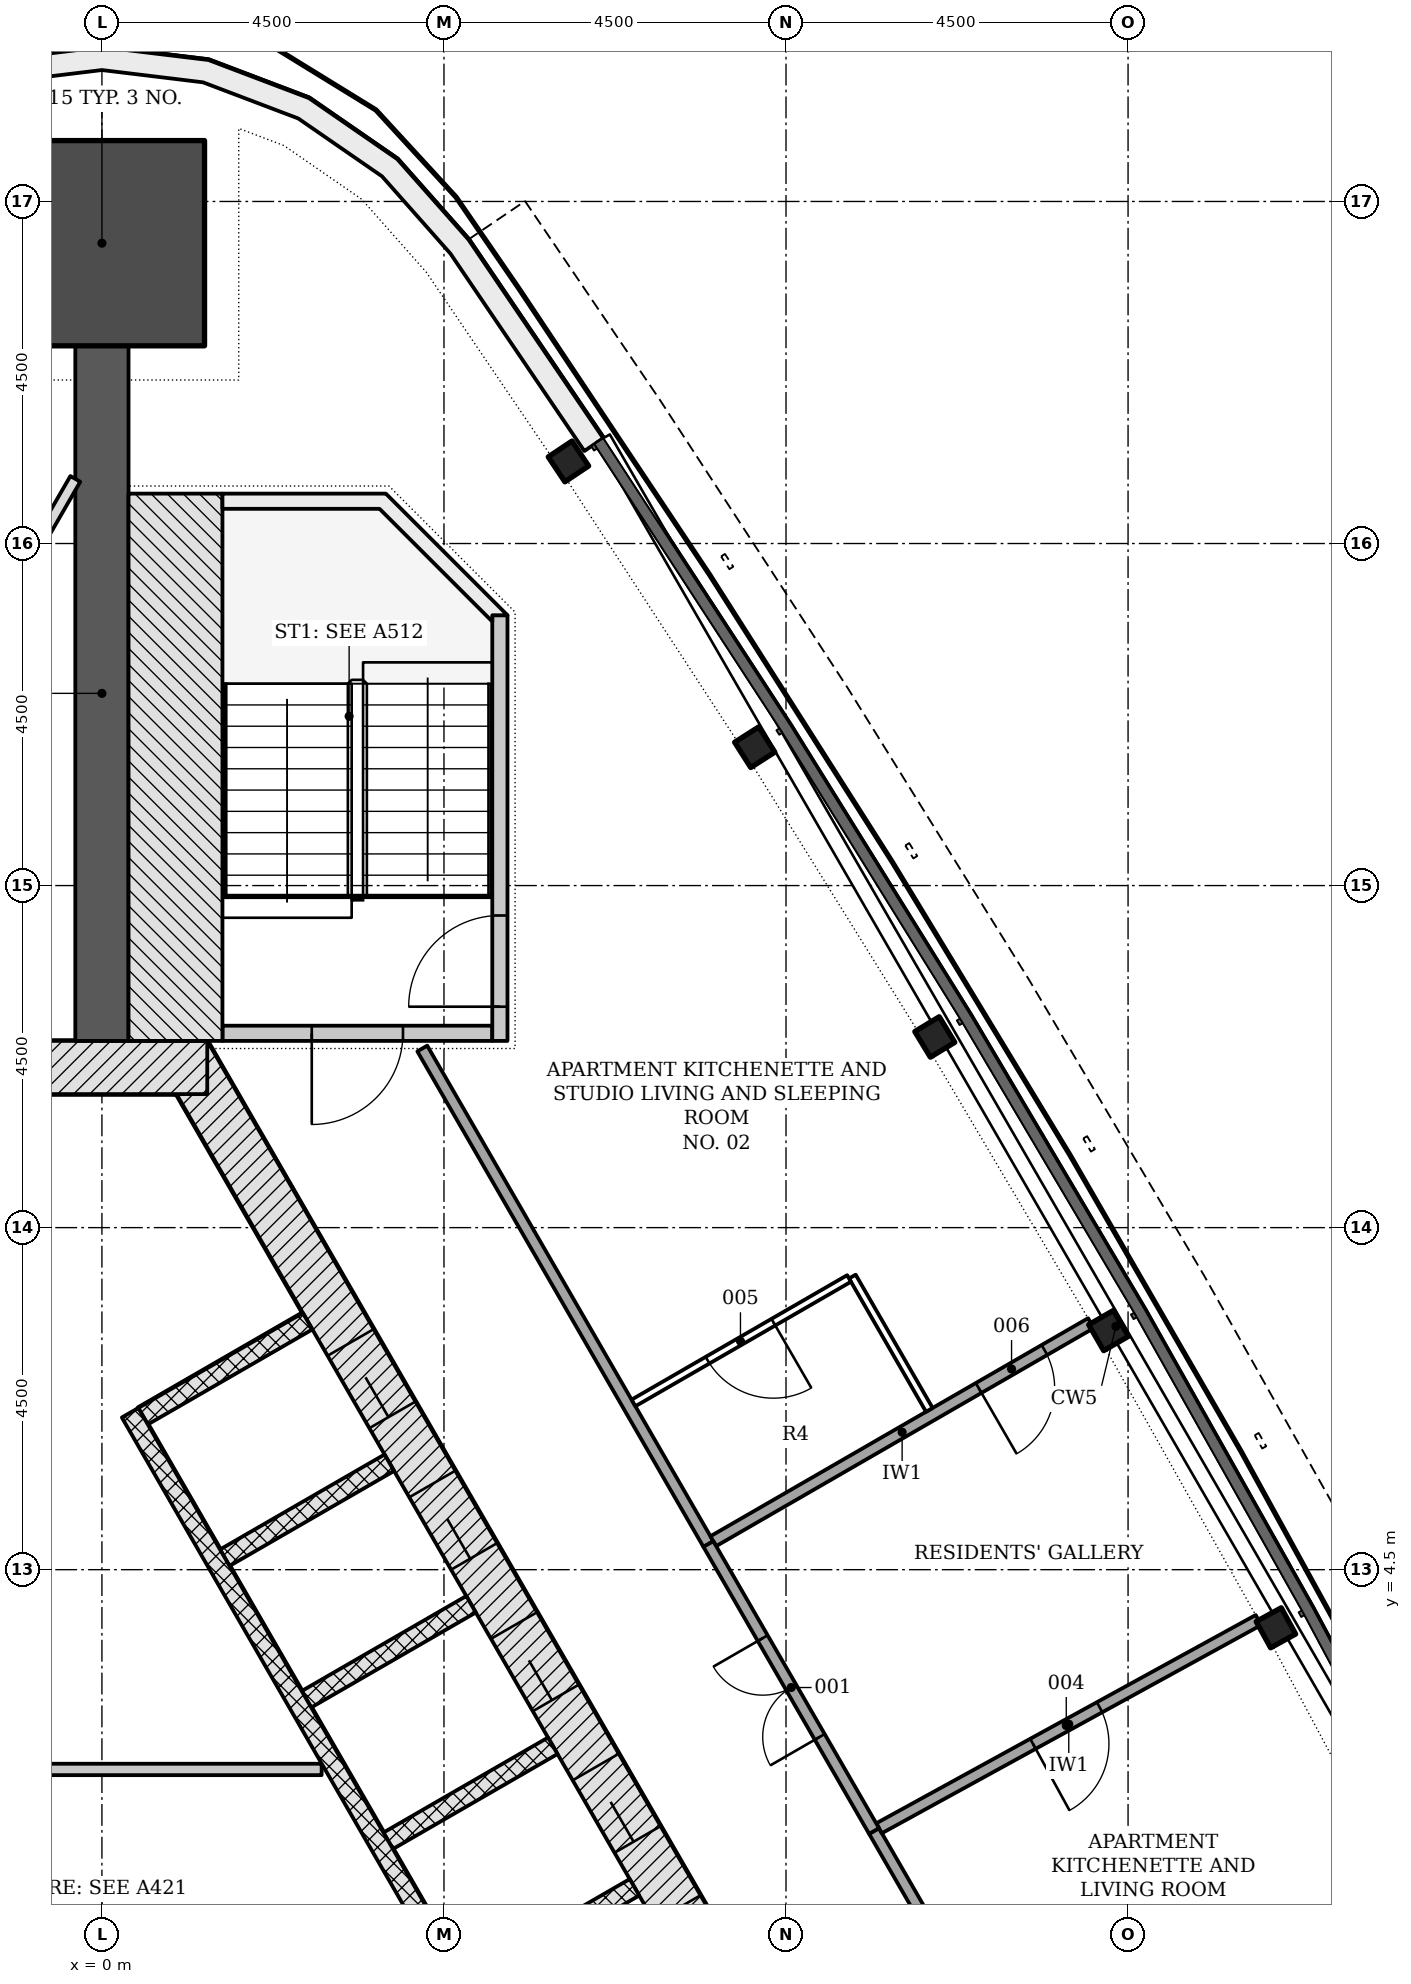
"""IFC4 building model, lengths in metres.
Left out: names, types, materials, properties, quantities, classifications, styles, units other than length and angle.
Written with IfcOpenShell. Run it as: python <this file> out.ifc"""

import sys

from ifc_helpers import new_model, si_unit, direction, frame, frame_2d, origin, origin_2d, place, context, subcontext, project, spatial, polyline, rectangle, i_section, outline, extrude, element, fill, save


model = new_model("IFC4")
c1 = context("Model", 3, precision=1e-05, world=origin(), true_north=direction((0.0, 1.0)))
c2 = subcontext(c1, "Body", "Model", "MODEL_VIEW")
j1 = project(units=[si_unit("LENGTHUNIT", "METRE"), si_unit("PLANEANGLEUNIT", "RADIAN")], contexts=[c1])
p1 = place(None, origin())
s1 = spatial("IfcSite", under=j1, at=p1, CompositionType="ELEMENT")
p2 = place(p1, origin())
s2 = spatial("IfcBuilding", under=s1, at=p2, CompositionType="ELEMENT")
p3 = place(p2, frame((0.0, 0.0, 192.3)))
s3 = spatial("IfcBuildingStorey", under=s2, at=p3, CompositionType="ELEMENT", Elevation=192.3)
p4 = place(p3, frame((10.311, -4.703, -0.2), z_axis=(0.0, 0.0, 1.0), x_axis=(-0.500001446645, 0.866024568562, 0.0)))
e1 = element("IfcWall", 1, at=p4, inside=s3, PredefinedType="SHEAR", context=c2, shape_type="SweptSolid", body=[
    extrude(rectangle(XDim=18.458, YDim=0.7, at=frame_2d((9.229, 0.0))), origin(), (0.0, 0.0, 1.0), 3.6),
])
p5 = place(p4, frame((4.379, 0.0, 0.2)))
e2 = element("IfcOpeningElement", 2, at=p5, cuts=e1, PredefinedType="OPENING", context=c2, shape_type="SweptSolid", body=[
    extrude(rectangle(XDim=1.1, YDim=2.1, at=frame_2d((0.55, 1.05))), frame((0.0, 0.36, 0.0), z_axis=(0.0, -1.0, 0.0), x_axis=(1.0, 0.0, 0.0)), (0.0, 0.0, 1.0), 0.72),
])
p6 = place(p4, frame((6.529, 0.0, 0.2)))
e3 = element("IfcOpeningElement", 3, at=p6, cuts=e1, PredefinedType="OPENING", context=c2, shape_type="SweptSolid", body=[
    extrude(rectangle(XDim=1.1, YDim=2.1, at=frame_2d((0.55, 1.05))), frame((0.0, 0.36, 0.0), z_axis=(0.0, -1.0, 0.0), x_axis=(1.0, 0.0, 0.0)), (0.0, 0.0, 1.0), 0.72),
])
p7 = place(p4, frame((8.679, 0.0, 0.2)))
e4 = element("IfcOpeningElement", 4, at=p7, cuts=e1, PredefinedType="OPENING", context=c2, shape_type="SweptSolid", body=[
    extrude(rectangle(XDim=1.1, YDim=2.1, at=frame_2d((0.55, 1.05))), frame((0.0, 0.36, 0.0), z_axis=(0.0, -1.0, 0.0), x_axis=(1.0, 0.0, 0.0)), (0.0, 0.0, 1.0), 0.72),
])
p8 = place(p4, frame((10.829, 0.0, 0.2)))
e5 = element("IfcOpeningElement", 5, at=p8, cuts=e1, PredefinedType="OPENING", context=c2, shape_type="SweptSolid", body=[
    extrude(rectangle(XDim=1.1, YDim=2.1, at=frame_2d((0.55, 1.05))), frame((0.0, 0.36, 0.0), z_axis=(0.0, -1.0, 0.0), x_axis=(1.0, 0.0, 0.0)), (0.0, 0.0, 1.0), 0.72),
])
p9 = place(p4, frame((12.979, 0.0, 0.2)))
e6 = element("IfcOpeningElement", 6, at=p9, cuts=e1, PredefinedType="OPENING", context=c2, shape_type="SweptSolid", body=[
    extrude(rectangle(XDim=1.1, YDim=2.1, at=frame_2d((0.55, 1.05))), frame((0.0, 0.36, 0.0), z_axis=(0.0, -1.0, 0.0), x_axis=(1.0, 0.0, 0.0)), (0.0, 0.0, 1.0), 0.72),
])
p10 = place(p3, frame((1.386, 11.106, -0.2), z_axis=(0.0, 0.0, 1.0), x_axis=(-1.0, 0.0, 0.0)))
e7 = element("IfcWall", 7, at=p10, inside=s3, PredefinedType="SHEAR", context=c2, shape_type="SweptSolid", body=[
    extrude(rectangle(XDim=2.771, YDim=0.7, at=frame_2d((1.386, 0.0))), origin(), (0.0, 0.0, 1.0), 3.6),
])
p11 = place(p3, frame((0.0, 11.456, -0.2), z_axis=(0.0, 0.0, 1.0), x_axis=(0.0, 1.0, 0.0)))
e8 = element("IfcWall", 8, at=p11, inside=s3, PredefinedType="SHEAR", context=c2, shape_type="SweptSolid", body=[
    extrude(rectangle(XDim=9.145, YDim=0.7, at=frame_2d((4.572, 0.0))), origin(), (0.0, 0.0, 1.0), 3.6),
])
p12 = place(p3, frame((0.0, 21.951, -0.2), z_axis=(0.0, 0.0, 1.0), x_axis=(0.0, 1.0, 0.0)))
e9 = element("IfcColumn", 9, at=p12, inside=s3, PredefinedType="COLUMN", context=c2, shape_type="SweptSolid", body=[
    extrude(rectangle(XDim=2.7, YDim=2.7, at=origin_2d()), origin(), (0.0, 0.0, 1.0), 3.6),
])
for number, where, z_axis, x_axis in (
    (10, (15.445, 3.735, -0.2), (0.0, 0.0, 1.0), (-0.481, 0.877, 0.0)),
    (11, (13.243, 7.646, -0.2), (0.0, 0.0, 1.0), (-0.5, 0.866, 0.0)),
    (12, (10.958, 11.508, -0.2), (0.0, 0.0, 1.0), (-0.519, 0.855, 0.0)),
    (13, (8.589, 15.32, -0.2), (0.0, 0.0, 1.0), (-0.537, 0.844, 0.0)),
    (14, (6.138, 19.08, -0.2), (0.0, 0.0, 1.0), (-0.555, 0.832, 0.0)),
):
    element("IfcColumn", number, at=place(p3, frame(where, z_axis=z_axis, x_axis=x_axis)), inside=s3, PredefinedType="COLUMN", context=c2, shape_type="SweptSolid", body=[
        extrude(i_section(OverallWidth=0.394, OverallDepth=0.376, WebThickness=0.017, FlangeThickness=0.028, FilletRadius=0.015, at=origin_2d()), origin(), (0.0, 0.0, 1.0), 3.6),
    ])
p13 = place(p3, origin())
e15 = element("IfcWall", 15, at=p13, inside=s3, PredefinedType="NOTDEFINED", context=c2, shape_type="SweptSolid", body=[
    extrude(outline(polyline([(6.595, 19.385), (4.822, 21.999), (3.885, 23.057), (2.723, 23.86), (1.402, 24.361), (0.0, 24.531), (-1.402, 24.361), (-2.723, 23.86), (-3.885, 23.057), (-4.822, 21.999), (-6.595, 19.385), (-6.347, 19.217), (-4.584, 21.815), (-3.685, 22.831), (-2.583, 23.592), (-1.33, 24.067), (0.0, 24.229), (1.33, 24.067), (2.583, 23.592), (3.685, 22.831), (4.584, 21.815), (6.347, 19.217), (6.595, 19.385)])), origin(), (0.0, 0.0, 1.0), 3.3),
])
p14 = place(p3, frame((7.006, 0.321, -0.2), z_axis=(0.0, 0.0, 1.0), x_axis=(-0.866022959057, -0.500004234368, 0.0)))
e16 = element("IfcWall", 16, at=p14, inside=s3, PredefinedType="PARTITIONING", context=c2, shape_type="SweptSolid", body=[
    extrude(rectangle(XDim=2.5, YDim=0.25, at=frame_2d((1.25, 0.0))), origin(), (0.0, 0.0, 1.0), 3.6),
])
p15 = place(p3, frame((5.931, 2.183, -0.2), z_axis=(0.0, 0.0, 1.0), x_axis=(-0.866047370643, -0.499961950354, 0.0)))
e17 = element("IfcWall", 17, at=p15, inside=s3, PredefinedType="PARTITIONING", context=c2, shape_type="SweptSolid", body=[
    extrude(rectangle(XDim=2.5, YDim=0.25, at=frame_2d((1.25, 0.0))), origin(), (0.0, 0.0, 1.0), 3.6),
])
for number, where, z_axis, x_axis in (
    (18, (4.856, 4.045, -0.2), (0.0, 0.0, 1.0), (-0.866, -0.5, 0.0)),
    (19, (3.781, 5.907, -0.2), (0.0, 0.0, 1.0), (-0.866, -0.5, 0.0)),
    (20, (2.706, 7.769, -0.2), (0.0, 0.0, 1.0), (-0.866, -0.5, 0.0)),
):
    element("IfcWall", number, at=place(p3, frame(where, z_axis=z_axis, x_axis=x_axis)), inside=s3, PredefinedType="PARTITIONING", context=c2, shape_type="SweptSolid", body=[
        extrude(rectangle(XDim=2.5, YDim=0.25, at=frame_2d((1.25, 0.0))), origin(), (0.0, 0.0, 1.0), 3.6),
    ])
p16 = place(p3, frame((5.87, -2.961, 0.0), z_axis=(0.0, 0.0, 1.0), x_axis=(-0.50000615651, 0.866021849293, 0.0)))
e21 = element("IfcWall", 21, at=p16, inside=s3, PredefinedType="PARTITIONING", context=c2, shape_type="SweptSolid", body=[
    extrude(rectangle(XDim=11.0, YDim=0.25, at=frame_2d((5.5, 0.0))), origin(), (0.0, 0.0, 1.0), 3.4),
])
p17 = place(p3, frame((-1.479, 1.872, 0.0), z_axis=(0.0, 0.0, 1.0), x_axis=(1.0, 0.0, 0.0)))
e22 = element("IfcWall", 22, at=p17, inside=s3, PredefinedType="PARTITIONING", context=c2, shape_type="SweptSolid", body=[
    extrude(rectangle(XDim=4.369, YDim=0.15, at=frame_2d((2.185, 0.0))), origin(), (0.0, 0.0, 1.0), 3.4),
])
p18 = place(p3, frame((5.135, 11.556, -0.2), z_axis=(0.0, 0.0, 1.0), x_axis=(-1.0, 0.0, 0.0)))
e23 = element("IfcWall", 23, at=p18, inside=s3, PredefinedType="SHEAR", context=c2, shape_type="SweptSolid", body=[
    extrude(rectangle(XDim=3.55, YDim=0.2, at=frame_2d((1.775, 0.0))), origin(), (0.0, 0.0, 1.0), 3.6),
])
p19 = place(p18, frame((1.175, 0.0, 0.2)))
e24 = element("IfcOpeningElement", 24, at=p19, cuts=e23, PredefinedType="OPENING", context=c2, shape_type="SweptSolid", body=[
    extrude(rectangle(XDim=1.2, YDim=2.1, at=frame_2d((0.6, 1.05))), frame((0.0, 0.11, 0.0), z_axis=(0.0, -1.0, 0.0), x_axis=(1.0, 0.0, 0.0)), (0.0, 0.0, 1.0), 0.22),
])
p20 = place(p3, frame((5.236, 11.456, -0.2), z_axis=(0.0, 0.0, 1.0), x_axis=(0.0, 1.0, 0.0)))
e25 = element("IfcWall", 25, at=p20, inside=s3, PredefinedType="SHEAR", context=c2, shape_type="SweptSolid", body=[
    extrude(rectangle(XDim=5.6, YDim=0.2, at=frame_2d((2.8, 0.0))), origin(), (0.0, 0.0, 1.0), 3.6),
])
p21 = place(p20, frame((0.45, 0.0, 0.2)))
e26 = element("IfcOpeningElement", 26, at=p21, cuts=e25, PredefinedType="OPENING", context=c2, shape_type="SweptSolid", body=[
    extrude(rectangle(XDim=1.2, YDim=2.1, at=frame_2d((0.6, 1.05))), frame((0.0, 0.11, 0.0), z_axis=(0.0, -1.0, 0.0), x_axis=(1.0, 0.0, 0.0)), (0.0, 0.0, 1.0), 0.22),
])
p22 = place(p3, frame((0.968, 11.456, -0.2), z_axis=(0.0, 0.0, 1.0), x_axis=(0.0, 1.0, 0.0)))
e27 = element("IfcWall", 27, at=p22, inside=s3, PredefinedType="SHEAR", context=c2, shape_type="SweptSolid", body=[
    extrude(rectangle(XDim=7.2, YDim=1.236, at=frame_2d((3.6, 0.0))), origin(), (0.0, 0.0, 1.0), 3.6),
])
p23 = place(p3, frame((0.0, 0.0, -0.2)))
e28 = element("IfcWall", 28, at=p23, inside=s3, PredefinedType="SHEAR", context=c2, shape_type="SweptSolid", body=[
    extrude(outline(polyline([(5.336, 17.056), (3.736, 18.656), (1.586, 18.656), (1.586, 18.456), (3.653, 18.456), (5.135, 16.974), (5.135, 17.056), (5.135, 17.056), (5.135, 17.056), (5.135, 17.056), (5.135, 17.056), (5.135, 17.056), (5.135, 17.056), (5.135, 17.056), (5.135, 17.056), (5.135, 17.056), (5.135, 17.056), (5.135, 17.056), (5.135, 17.056), (5.135, 17.056), (5.135, 17.056), (5.135, 17.056), (5.135, 17.056), (5.336, 17.056)])), origin(), (0.0, 0.0, 1.0), 3.6),
])
p24 = place(p3, frame((15.807, -8.722, 0.0), z_axis=(0.0, 0.0, 1.0), x_axis=(-0.500004300164, 0.866022921069, 0.0)))
e29 = element("IfcWall", 29, at=p24, inside=s3, PredefinedType="PARTITIONING", context=c2, shape_type="SweptSolid", body=[
    extrude(rectangle(XDim=11.297, YDim=0.15, at=frame_2d((5.649, 0.0))), origin(), (0.0, 0.0, 1.0), 2.852),
])
p25 = place(p3, frame((7.979, 4.837, 0.0), z_axis=(0.0, 0.0, 1.0), x_axis=(-0.500014427086, 0.866017074142, 0.0)))
e30 = element("IfcWall", 30, at=p25, inside=s3, PredefinedType="PARTITIONING", context=c2, shape_type="SweptSolid", body=[
    extrude(rectangle(XDim=7.528, YDim=0.15, at=frame_2d((3.764, 0.0))), origin(), (0.0, 0.0, 1.0), 2.852),
])
p26 = place(p3, frame((15.216, 3.837, 0.0), z_axis=(0.0, 0.0, 1.0), x_axis=(-0.876645576733, -0.48113670905, 0.0)))
e31 = element("IfcWall", 31, at=p26, inside=s3, PredefinedType="PARTITIONING", context=c2, shape_type="SweptSolid", body=[
    extrude(rectangle(XDim=5.694, YDim=0.15, at=frame_2d((2.847, 0.0))), origin(), (0.0, 0.0, 1.0), 3.4),
])
p27 = place(p26, frame((2.385, 0.0, 0.0)))
e32 = element("IfcOpeningElement", 32, at=p27, cuts=e31, PredefinedType="OPENING", context=c2, shape_type="SweptSolid", body=[
    extrude(rectangle(XDim=1.0, YDim=2.1, at=frame_2d((0.5, 1.05))), frame((0.0, 0.085, 0.0), z_axis=(0.0, -1.0, 0.0), x_axis=(1.0, 0.0, 0.0)), (0.0, 0.0, 1.0), 0.17),
])
p28 = place(p3, frame((13.012, 7.743, 0.0), z_axis=(0.0, 0.0, 1.0), x_axis=(-0.866026840724, -0.499997511139, 0.0)))
e33 = element("IfcWall", 33, at=p28, inside=s3, PredefinedType="PARTITIONING", context=c2, shape_type="SweptSolid", body=[
    extrude(rectangle(XDim=5.737, YDim=0.15, at=frame_2d((2.868, 0.0))), origin(), (0.0, 0.0, 1.0), 3.4),
])
p29 = place(p28, frame((0.706, 0.0, 0.0)))
e34 = element("IfcOpeningElement", 34, at=p29, cuts=e33, PredefinedType="OPENING", context=c2, shape_type="SweptSolid", body=[
    extrude(rectangle(XDim=1.0, YDim=2.1, at=frame_2d((0.5, 1.05))), frame((0.0, 0.085, 0.0), z_axis=(0.0, -1.0, 0.0), x_axis=(1.0, 0.0, 0.0)), (0.0, 0.0, 1.0), 0.17),
])
p30 = place(p3, frame((10.158, 1.062, 0.0), z_axis=(0.0, 0.0, 1.0), x_axis=(-0.499969679245, 0.866042908773, 0.0)))
e35 = element("IfcWall", 35, at=p30, inside=s3, PredefinedType="PARTITIONING", context=c2, shape_type="SweptSolid", body=[
    extrude(rectangle(XDim=4.36, YDim=0.15, at=frame_2d((2.18, 0.0))), origin(), (0.0, 0.0, 1.0), 2.852),
])
p31 = place(p30, frame((1.43, 0.0, 0.0)))
e36 = element("IfcOpeningElement", 36, at=p31, cuts=e35, PredefinedType="OPENING", context=c2, shape_type="SweptSolid", body=[
    extrude(rectangle(XDim=1.5, YDim=2.1, at=frame_2d((0.75, 1.05))), frame((0.0, 0.085, 0.0), z_axis=(0.0, -1.0, 0.0), x_axis=(1.0, 0.0, 0.0)), (0.0, 0.0, 1.0), 0.17),
])
p32 = place(p3, frame((10.885, 6.602, 0.0), z_axis=(0.0, 0.0, 1.0), x_axis=(-0.499990325971, 0.866030989016, 0.0)))
e37 = element("IfcWall", 37, at=p32, inside=s3, PredefinedType="PARTITIONING", context=c2, shape_type="SweptSolid", body=[
    extrude(rectangle(XDim=2.025, YDim=0.1, at=frame_2d((1.012, 0.0))), origin(), (0.0, 0.0, 1.0), 3.4),
])
p33 = place(p3, frame((9.83, 8.331, 0.0), z_axis=(0.0, 0.0, 1.0), x_axis=(-0.865995643347, -0.500051543047, 0.0)))
e38 = element("IfcWall", 38, at=p33, inside=s3, PredefinedType="PARTITIONING", context=c2, shape_type="SweptSolid", body=[
    extrude(rectangle(XDim=3.275, YDim=0.1, at=frame_2d((1.638, 0.0))), origin(), (0.0, 0.0, 1.0), 3.4),
])
p34 = place(p33, frame((1.15, 0.0, 0.0)))
e39 = element("IfcOpeningElement", 39, at=p34, cuts=e38, PredefinedType="OPENING", context=c2, shape_type="SweptSolid", body=[
    extrude(rectangle(XDim=1.0, YDim=2.1, at=frame_2d((0.5, 1.05))), frame((0.0, 0.06, 0.0), z_axis=(0.0, -1.0, 0.0), x_axis=(1.0, 0.0, 0.0)), (0.0, 0.0, 1.0), 0.12),
])
p35 = place(p3, frame((-0.35, 18.85, 0.0), z_axis=(0.0, 0.0, 1.0), x_axis=(-0.500000553364, -0.866025084299, 0.0)))
e40 = element("IfcWall", 40, at=p35, inside=s3, PredefinedType="PARTITIONING", context=c2, shape_type="SweptSolid", body=[
    extrude(rectangle(XDim=11.981, YDim=0.15, at=frame_2d((5.991, 0.0))), origin(), (0.0, 0.0, 1.0), 2.852),
])
p36 = place(p6, origin())
e41 = element("IfcDoor", 41, at=p36, inside=s3, OperationType="DOUBLE_DOOR_SLIDING", PredefinedType="DOOR", context=c2, shape_type="SweptSolid", body=[
    extrude(rectangle(XDim=1.1, YDim=2.1, at=frame_2d((0.55, 1.05))), frame((0.0, 0.025, 0.0), z_axis=(0.0, -1.0, 0.0), x_axis=(1.0, 0.0, 0.0)), (0.0, 0.0, 1.0), 0.05),
])
fill(e3, e41)
p37 = place(p7, origin())
e42 = element("IfcDoor", 42, at=p37, inside=s3, OperationType="DOUBLE_DOOR_SLIDING", PredefinedType="DOOR", context=c2, shape_type="SweptSolid", body=[
    extrude(rectangle(XDim=1.1, YDim=2.1, at=frame_2d((0.55, 1.05))), frame((0.0, 0.025, 0.0), z_axis=(0.0, -1.0, 0.0), x_axis=(1.0, 0.0, 0.0)), (0.0, 0.0, 1.0), 0.05),
])
fill(e4, e42)
p38 = place(p8, origin())
e43 = element("IfcDoor", 43, at=p38, inside=s3, OperationType="DOUBLE_DOOR_SLIDING", PredefinedType="DOOR", context=c2, shape_type="SweptSolid", body=[
    extrude(rectangle(XDim=1.1, YDim=2.1, at=frame_2d((0.55, 1.05))), frame((0.0, 0.025, 0.0), z_axis=(0.0, -1.0, 0.0), x_axis=(1.0, 0.0, 0.0)), (0.0, 0.0, 1.0), 0.05),
])
fill(e5, e43)
p39 = place(p9, origin())
e44 = element("IfcDoor", 44, at=p39, inside=s3, OperationType="DOUBLE_DOOR_SLIDING", PredefinedType="DOOR", context=c2, shape_type="SweptSolid", body=[
    extrude(rectangle(XDim=1.1, YDim=2.1, at=frame_2d((0.55, 1.05))), frame((0.0, 0.025, 0.0), z_axis=(0.0, -1.0, 0.0), x_axis=(1.0, 0.0, 0.0)), (0.0, 0.0, 1.0), 0.05),
])
fill(e6, e44)
p40 = place(p19, origin())
e45 = element("IfcDoor", 45, at=p40, inside=s3, OperationType="SINGLE_SWING_RIGHT", PredefinedType="DOOR", context=c2, shape_type="SweptSolid", body=[
    extrude(rectangle(XDim=1.2, YDim=2.1, at=frame_2d((0.6, 1.05))), frame((0.0, 0.025, 0.0), z_axis=(0.0, -1.0, 0.0), x_axis=(1.0, 0.0, 0.0)), (0.0, 0.0, 1.0), 0.05),
])
fill(e24, e45)
p41 = place(p21, origin())
e46 = element("IfcDoor", 46, at=p41, inside=s3, OperationType="SINGLE_SWING_LEFT", PredefinedType="DOOR", context=c2, shape_type="SweptSolid", body=[
    extrude(rectangle(XDim=1.2, YDim=2.1, at=frame_2d((0.6, 1.05))), frame((0.0, 0.025, 0.0), z_axis=(0.0, -1.0, 0.0), x_axis=(1.0, 0.0, 0.0)), (0.0, 0.0, 1.0), 0.05),
])
fill(e26, e46)
p42 = place(p31, origin())
e47 = element("IfcDoor", 47, at=p42, inside=s3, OperationType="DOUBLE_DOOR_SINGLE_SWING", PredefinedType="DOOR", context=c2, shape_type="SweptSolid", body=[
    extrude(rectangle(XDim=1.5, YDim=2.1, at=frame_2d((0.75, 1.05))), frame((0.0, 0.025, 0.0), z_axis=(0.0, -1.0, 0.0), x_axis=(1.0, 0.0, 0.0)), (0.0, 0.0, 1.0), 0.05),
])
fill(e36, e47)
p43 = place(p27, origin())
e48 = element("IfcDoor", 48, at=p43, inside=s3, OperationType="SINGLE_SWING_RIGHT", PredefinedType="DOOR", context=c2, shape_type="SweptSolid", body=[
    extrude(rectangle(XDim=1.0, YDim=2.1, at=frame_2d((0.5, 1.05))), frame((0.0, 0.025, 0.0), z_axis=(0.0, -1.0, 0.0), x_axis=(1.0, 0.0, 0.0)), (0.0, 0.0, 1.0), 0.05),
])
fill(e32, e48)
p44 = place(p34, origin())
e49 = element("IfcDoor", 49, at=p44, inside=s3, OperationType="SINGLE_SWING_LEFT", PredefinedType="DOOR", context=c2, shape_type="SweptSolid", body=[
    extrude(rectangle(XDim=1.0, YDim=2.1, at=frame_2d((0.5, 1.05))), frame((0.0, 0.025, 0.0), z_axis=(0.0, -1.0, 0.0), x_axis=(1.0, 0.0, 0.0)), (0.0, 0.0, 1.0), 0.05),
])
fill(e39, e49)
p45 = place(p29, origin())
e50 = element("IfcDoor", 50, at=p45, inside=s3, OperationType="SINGLE_SWING_RIGHT", PredefinedType="DOOR", context=c2, shape_type="SweptSolid", body=[
    extrude(rectangle(XDim=1.0, YDim=2.1, at=frame_2d((0.5, 1.05))), frame((0.0, 0.025, 0.0), z_axis=(0.0, -1.0, 0.0), x_axis=(1.0, 0.0, 0.0)), (0.0, 0.0, 1.0), 0.05),
])
fill(e34, e50)
save(model, sys.argv[1])
